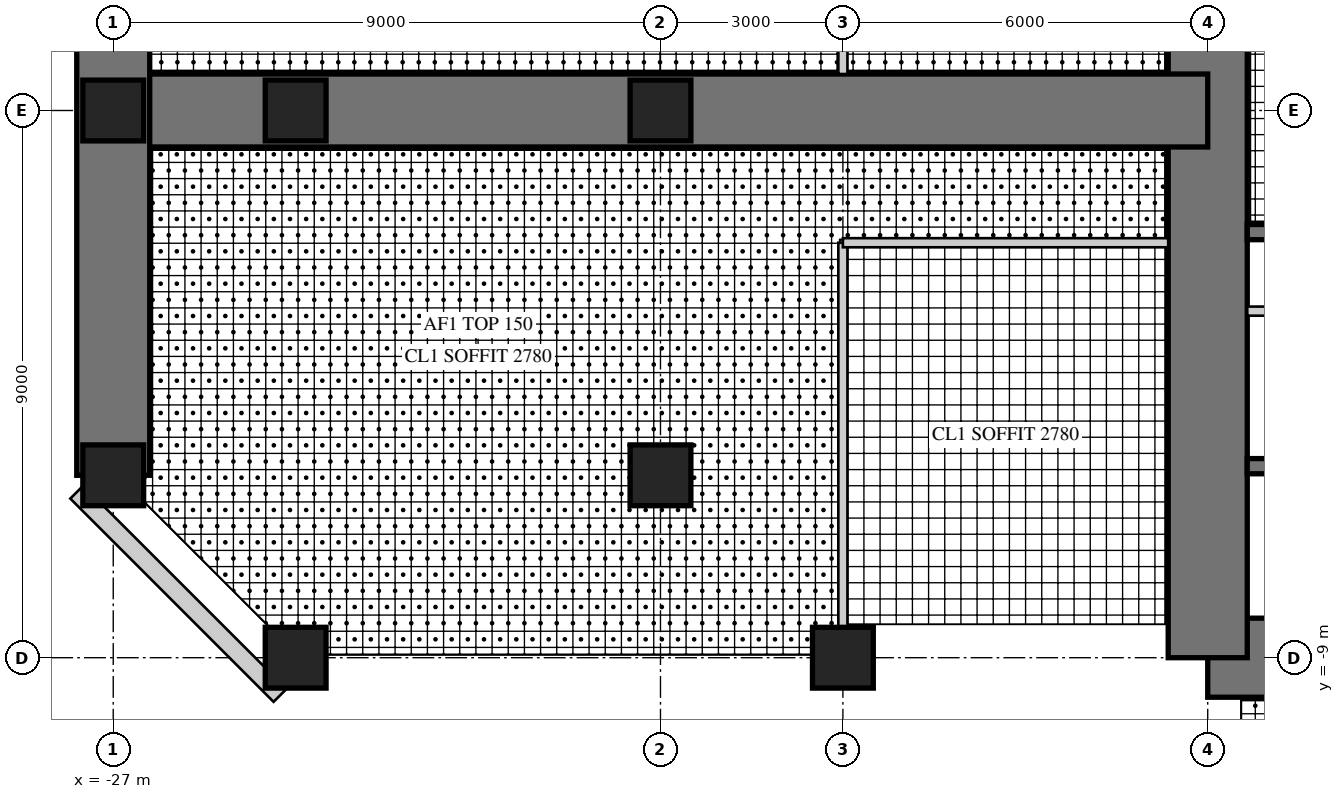
"""IFC4 building model, lengths in metres.
Left out: names, types, materials, properties, quantities, classifications, styles, units other than length and angle.
Written with IfcOpenShell. Run it as: python <this file> out.ifc"""

import sys

from ifc_helpers import new_model, si_unit, direction, frame, frame_2d, origin, origin_2d, place, context, subcontext, project, spatial, rectangle, hollow_rectangle, extrude, element, fill, save


model = new_model("IFC4")
c1 = context("Model", 3, precision=1e-05, world=origin(), true_north=direction((0.0, 1.0)))
c2 = subcontext(c1, "Body", "Model", "MODEL_VIEW")
j1 = project(units=[si_unit("LENGTHUNIT", "METRE"), si_unit("PLANEANGLEUNIT", "RADIAN")], contexts=[c1])
p1 = place(None, origin())
s1 = spatial("IfcSite", under=j1, at=p1, CompositionType="ELEMENT")
p2 = place(p1, origin())
s2 = spatial("IfcBuilding", under=s1, at=p2, CompositionType="ELEMENT")
p3 = place(p2, frame((0.0, 0.0, 116.5)))
s3 = spatial("IfcBuildingStorey", under=s2, at=p3, CompositionType="ELEMENT", Elevation=116.5)
p4 = place(p3, frame((-9.0, -9.0, 0.0), z_axis=(0.0, 0.0, 1.0), x_axis=(1.0, 0.0, 0.0)))
e1 = element("IfcWall", 1, at=p4, inside=s3, PredefinedType="SHEAR", context=c2, shape_type="SweptSolid", body=[
    extrude(rectangle(XDim=18.0, YDim=1.3, at=frame_2d((9.0, 0.0))), origin(), (0.0, 0.0, 1.0), 4.0),
])
p5 = place(p4, frame((9.8, 0.0, 0.0)))
e2 = element("IfcOpeningElement", 2, at=p5, cuts=e1, PredefinedType="OPENING", context=c2, shape_type="SweptSolid", body=[
    extrude(rectangle(XDim=1.0, YDim=2.4, at=frame_2d((0.5, 1.2))), frame((0.0, 0.66, 0.0), z_axis=(0.0, -1.0, 0.0), x_axis=(1.0, 0.0, 0.0)), (0.0, 0.0, 1.0), 1.32),
])
p6 = place(p3, frame((-9.0, 9.0, 0.0), z_axis=(0.0, 0.0, 1.0), x_axis=(0.0, -1.0, 0.0)))
e3 = element("IfcWall", 3, at=p6, inside=s3, PredefinedType="SHEAR", context=c2, shape_type="SweptSolid", body=[
    extrude(rectangle(XDim=18.0, YDim=1.3, at=frame_2d((9.0, 0.0))), origin(), (0.0, 0.0, 1.0), 4.0),
])
p7 = place(p6, frame((9.8, 0.0, 0.0)))
e4 = element("IfcOpeningElement", 4, at=p7, cuts=e3, PredefinedType="OPENING", context=c2, shape_type="SweptSolid", body=[
    extrude(rectangle(XDim=1.0, YDim=2.4, at=frame_2d((0.5, 1.2))), frame((0.0, 0.66, 0.0), z_axis=(0.0, -1.0, 0.0), x_axis=(1.0, 0.0, 0.0)), (0.0, 0.0, 1.0), 1.32),
])
for number, where, z_axis, x_axis in (
    (5, (-1.925, -2.0, 0.0), (0.0, 0.0, 1.0), (-1.0, 0.0, 0.0)),
    (6, (-1.925, -5.85, 0.0), (0.0, 0.0, 1.0), (-1.0, 0.0, 0.0)),
):
    element("IfcWall", number, at=place(p3, frame(where, z_axis=z_axis, x_axis=x_axis)), inside=s3, PredefinedType="SHEAR", context=c2, shape_type="SweptSolid", body=[
        extrude(rectangle(XDim=6.425, YDim=0.25, at=frame_2d((3.212, 0.0))), origin(), (0.0, 0.0, 1.0), 4.0),
    ])
p8 = place(p3, frame((-1.925, -3.3, 0.0), z_axis=(0.0, 0.0, 1.0), x_axis=(-1.0, 0.0, 0.0)))
e7 = element("IfcWall", 7, at=p8, inside=s3, PredefinedType="PARTITIONING", context=c2, shape_type="SweptSolid", body=[
    extrude(rectangle(XDim=6.425, YDim=0.15, at=frame_2d((3.212, 0.0))), origin(), (0.0, 0.0, 1.0), 4.0),
])
p9 = place(p8, frame((0.075, 0.0, 0.0)))
e8 = element("IfcOpeningElement", 8, at=p9, cuts=e7, PredefinedType="OPENING", context=c2, shape_type="SweptSolid", body=[
    extrude(rectangle(XDim=0.8, YDim=2.1, at=frame_2d((0.4, 1.05))), frame((0.0, 0.085, 0.0), z_axis=(0.0, -1.0, 0.0), x_axis=(1.0, 0.0, 0.0)), (0.0, 0.0, 1.0), 0.17),
])
p10 = place(p8, frame((3.675, 0.0, 0.0)))
e9 = element("IfcOpeningElement", 9, at=p10, cuts=e7, PredefinedType="OPENING", context=c2, shape_type="SweptSolid", body=[
    extrude(rectangle(XDim=0.8, YDim=2.1, at=frame_2d((0.4, 1.05))), frame((0.0, 0.085, 0.0), z_axis=(0.0, -1.0, 0.0), x_axis=(1.0, 0.0, 0.0)), (0.0, 0.0, 1.0), 0.17),
])
p11 = place(p3, frame((-9.0, 0.0, 0.0), z_axis=(0.0, 0.0, 1.0), x_axis=(-1.0, 0.0, 0.0)))
e10 = element("IfcWall", 10, at=p11, inside=s3, PredefinedType="SHEAR", context=c2, shape_type="SweptSolid", body=[
    extrude(rectangle(XDim=18.0, YDim=1.2, at=frame_2d((9.0, 0.0))), origin(), (0.0, 0.0, 1.0), 4.0),
])
p12 = place(p11, frame((9.8, 0.0, 0.0)))
e11 = element("IfcOpeningElement", 11, at=p12, cuts=e10, PredefinedType="OPENING", context=c2, shape_type="SweptSolid", body=[
    extrude(rectangle(XDim=1.0, YDim=2.2, at=frame_2d((0.5, 1.1))), frame((0.0, 0.61, 0.0), z_axis=(0.0, -1.0, 0.0), x_axis=(1.0, 0.0, 0.0)), (0.0, 0.0, 1.0), 1.22),
])
p13 = place(p3, frame((-27.0, 6.0, 0.0), z_axis=(0.0, 0.0, 1.0), x_axis=(0.0, -1.0, 0.0)))
e12 = element("IfcWall", 12, at=p13, inside=s3, PredefinedType="SHEAR", context=c2, shape_type="SweptSolid", body=[
    extrude(rectangle(XDim=12.0, YDim=1.2, at=frame_2d((6.0, 0.0))), origin(), (0.0, 0.0, 1.0), 4.0),
])
p14 = place(p13, frame((1.55, 0.0, 0.6)))
e13 = element("IfcOpeningElement", 13, at=p14, cuts=e12, PredefinedType="OPENING", context=c2, shape_type="SweptSolid", body=[
    extrude(rectangle(XDim=3.0, YDim=2.4, at=frame_2d((1.5, 1.2))), frame((0.0, 0.61, 0.0), z_axis=(0.0, -1.0, 0.0), x_axis=(1.0, 0.0, 0.0)), (0.0, 0.0, 1.0), 1.22),
])
p15 = place(p13, frame((7.45, 0.0, 0.6)))
e14 = element("IfcOpeningElement", 14, at=p15, cuts=e12, PredefinedType="OPENING", context=c2, shape_type="SweptSolid", body=[
    extrude(rectangle(XDim=3.0, YDim=2.4, at=frame_2d((1.5, 1.2))), frame((0.0, 0.61, 0.0), z_axis=(0.0, -1.0, 0.0), x_axis=(1.0, 0.0, 0.0)), (0.0, 0.0, 1.0), 1.22),
])
for number, where, z_axis, x_axis in (
    (15, (-15.0, -9.0, 0.0), (0.0, 0.0, 1.0), (1.0, 0.0, 0.0)),
    (16, (-24.0, -9.0, 0.0), (0.0, 0.0, 1.0), (1.0, 0.0, 0.0)),
    (17, (-27.0, 0.0, 0.0), (0.0, 0.0, 1.0), (1.0, 0.0, 0.0)),
    (18, (-27.0, -6.0, 0.0), (0.0, 0.0, 1.0), (1.0, 0.0, 0.0)),
    (19, (-18.0, 0.0, 0.0), (0.0, 0.0, 1.0), (1.0, 0.0, 0.0)),
    (20, (-18.0, -6.0, 0.0), (0.0, 0.0, 1.0), (1.0, 0.0, 0.0)),
    (21, (-24.0, 0.0, 0.0), (0.0, 0.0, 1.0), (1.0, 0.0, 0.0)),
):
    element("IfcColumn", number, at=place(p3, frame(where, z_axis=z_axis, x_axis=x_axis)), inside=s3, PredefinedType="COLUMN", context=c2, shape_type="SweptSolid", body=[
        extrude(rectangle(XDim=1.0, YDim=1.0, at=origin_2d()), origin(), (0.0, 0.0, 1.0), 4.0),
    ])
p16 = place(p3, frame((-27.6, -6.277, 0.0), z_axis=(0.0, 0.0, 1.0), x_axis=(0.707106781187, -0.707106781187, 0.0)))
e22 = element("IfcWall", 22, at=p16, inside=s3, PredefinedType="SOLIDWALL", context=c2, shape_type="SweptSolid", body=[
    extrude(rectangle(XDim=4.728, YDim=0.3, at=frame_2d((2.364, 0.0))), origin(), (0.0, 0.0, 1.0), 3.8),
])
p17 = place(p16, frame((1.914, 0.0, 0.3)))
e23 = element("IfcOpeningElement", 23, at=p17, cuts=e22, PredefinedType="OPENING", context=c2, shape_type="SweptSolid", body=[
    extrude(rectangle(XDim=0.9, YDim=2.4, at=frame_2d((0.45, 1.2))), frame((0.0, 0.16, 0.0), z_axis=(0.0, -1.0, 0.0), x_axis=(1.0, 0.0, 0.0)), (0.0, 0.0, 1.0), 0.32),
])
p18 = place(p3, frame((-15.0, -2.175, 0.0), z_axis=(0.0, 0.0, 1.0), x_axis=(0.0, -1.0, 0.0)))
e24 = element("IfcWall", 24, at=p18, inside=s3, PredefinedType="PARTITIONING", context=c2, shape_type="SweptSolid", body=[
    extrude(rectangle(XDim=6.325, YDim=0.15, at=frame_2d((3.163, 0.0))), origin(), (0.0, 0.0, 1.0), 3.0),
])
p19 = place(p18, frame((2.663, 0.0, 0.0)))
e25 = element("IfcOpeningElement", 25, at=p19, cuts=e24, PredefinedType="OPENING", context=c2, shape_type="SweptSolid", body=[
    extrude(rectangle(XDim=1.0, YDim=2.1, at=frame_2d((0.5, 1.05))), frame((0.0, 0.085, 0.0), z_axis=(0.0, -1.0, 0.0), x_axis=(1.0, 0.0, 0.0)), (0.0, 0.0, 1.0), 0.17),
])
p20 = place(p3, frame((-9.65, -2.175, 0.0), z_axis=(0.0, 0.0, 1.0), x_axis=(-1.0, 0.0, 0.0)))
e26 = element("IfcWall", 26, at=p20, inside=s3, PredefinedType="PARTITIONING", context=c2, shape_type="SweptSolid", body=[
    extrude(rectangle(XDim=5.35, YDim=0.15, at=frame_2d((2.675, 0.0))), origin(), (0.0, 0.0, 1.0), 3.8),
])
p21 = place(p3, frame((-15.0, 8.5, 0.0), z_axis=(0.0, 0.0, 1.0), x_axis=(0.0, -1.0, 0.0)))
e27 = element("IfcWall", 27, at=p21, inside=s3, PredefinedType="PARTITIONING", context=c2, shape_type="SweptSolid", body=[
    extrude(rectangle(XDim=7.9, YDim=0.15, at=frame_2d((3.95, 0.0))), origin(), (0.0, 0.0, 1.0), 3.0),
])
p22 = place(p21, frame((1.45, 0.0, 0.0)))
e28 = element("IfcOpeningElement", 28, at=p22, cuts=e27, PredefinedType="OPENING", context=c2, shape_type="SweptSolid", body=[
    extrude(rectangle(XDim=1.0, YDim=2.1, at=frame_2d((0.5, 1.05))), frame((0.0, 0.085, 0.0), z_axis=(0.0, -1.0, 0.0), x_axis=(1.0, 0.0, 0.0)), (0.0, 0.0, 1.0), 0.17),
])
p23 = place(p21, frame((5.4, 0.0, 0.0)))
e29 = element("IfcOpeningElement", 29, at=p23, cuts=e27, PredefinedType="OPENING", context=c2, shape_type="SweptSolid", body=[
    extrude(rectangle(XDim=1.0, YDim=2.1, at=frame_2d((0.5, 1.05))), frame((0.0, 0.085, 0.0), z_axis=(0.0, -1.0, 0.0), x_axis=(1.0, 0.0, 0.0)), (0.0, 0.0, 1.0), 0.17),
])
p24 = place(p15, origin())
e30 = element("IfcWindow", 30, at=p24, inside=s3, PartitioningType="SINGLE_PANEL", PredefinedType="WINDOW", context=c2, shape_type="SweptSolid", body=[
    extrude(hollow_rectangle(XDim=3.0, YDim=2.4, WallThickness=0.06, at=frame_2d((1.5, 1.2))), frame((0.0, 0.03, 0.0), z_axis=(0.0, -1.0, 0.0), x_axis=(1.0, 0.0, 0.0)), (0.0, 0.0, 1.0), 0.06),
    extrude(rectangle(XDim=2.879, YDim=2.279, at=frame_2d((1.5, 1.2))), frame((0.0, 0.03, 0.0), z_axis=(0.0, -1.0, 0.0), x_axis=(1.0, 0.0, 0.0)), (0.0, 0.0, 1.0), 0.06),
])
fill(e14, e30)
p25 = place(p17, origin())
e31 = element("IfcWindow", 31, at=p25, inside=s3, PartitioningType="SINGLE_PANEL", PredefinedType="WINDOW", context=c2, shape_type="SweptSolid", body=[
    extrude(hollow_rectangle(XDim=0.9, YDim=2.4, WallThickness=0.06, at=frame_2d((0.45, 1.2))), frame((0.0, 0.03, 0.0), z_axis=(0.0, -1.0, 0.0), x_axis=(1.0, 0.0, 0.0)), (0.0, 0.0, 1.0), 0.06),
    extrude(rectangle(XDim=0.779, YDim=2.279, at=frame_2d((0.45, 1.2))), frame((0.0, 0.03, 0.0), z_axis=(0.0, -1.0, 0.0), x_axis=(1.0, 0.0, 0.0)), (0.0, 0.0, 1.0), 0.06),
])
fill(e23, e31)
p26 = place(p19, origin())
e32 = element("IfcDoor", 32, at=p26, inside=s3, OperationType="SINGLE_SWING_LEFT", PredefinedType="DOOR", context=c2, shape_type="SweptSolid", body=[
    extrude(rectangle(XDim=1.0, YDim=2.1, at=frame_2d((0.5, 1.05))), frame((0.0, 0.025, 0.0), z_axis=(0.0, -1.0, 0.0), x_axis=(1.0, 0.0, 0.0)), (0.0, 0.0, 1.0), 0.05),
])
fill(e25, e32)
p27 = place(p12, frame((1.0, 0.0, 0.0), z_axis=(0.0, 0.0, 1.0), x_axis=(-1.0, 0.0, 0.0)))
e33 = element("IfcDoor", 33, at=p27, inside=s3, OperationType="SINGLE_SWING_RIGHT", PredefinedType="DOOR", context=c2, shape_type="SweptSolid", body=[
    extrude(rectangle(XDim=1.0, YDim=2.2, at=frame_2d((0.5, 1.1))), frame((0.0, 0.025, 0.0), z_axis=(0.0, -1.0, 0.0), x_axis=(1.0, 0.0, 0.0)), (0.0, 0.0, 1.0), 0.05),
])
fill(e11, e33)
p28 = place(p7, frame((1.0, 0.0, 0.0), z_axis=(0.0, 0.0, 1.0), x_axis=(-1.0, 0.0, 0.0)))
e34 = element("IfcDoor", 34, at=p28, inside=s3, OperationType="SINGLE_SWING_RIGHT", PredefinedType="DOOR", context=c2, shape_type="SweptSolid", body=[
    extrude(rectangle(XDim=1.0, YDim=2.4, at=frame_2d((0.5, 1.2))), frame((0.0, -0.005, 0.0), z_axis=(0.0, -1.0, 0.0), x_axis=(1.0, 0.0, 0.0)), (0.0, 0.0, 1.0), 0.05),
])
fill(e4, e34)
save(model, sys.argv[1])
